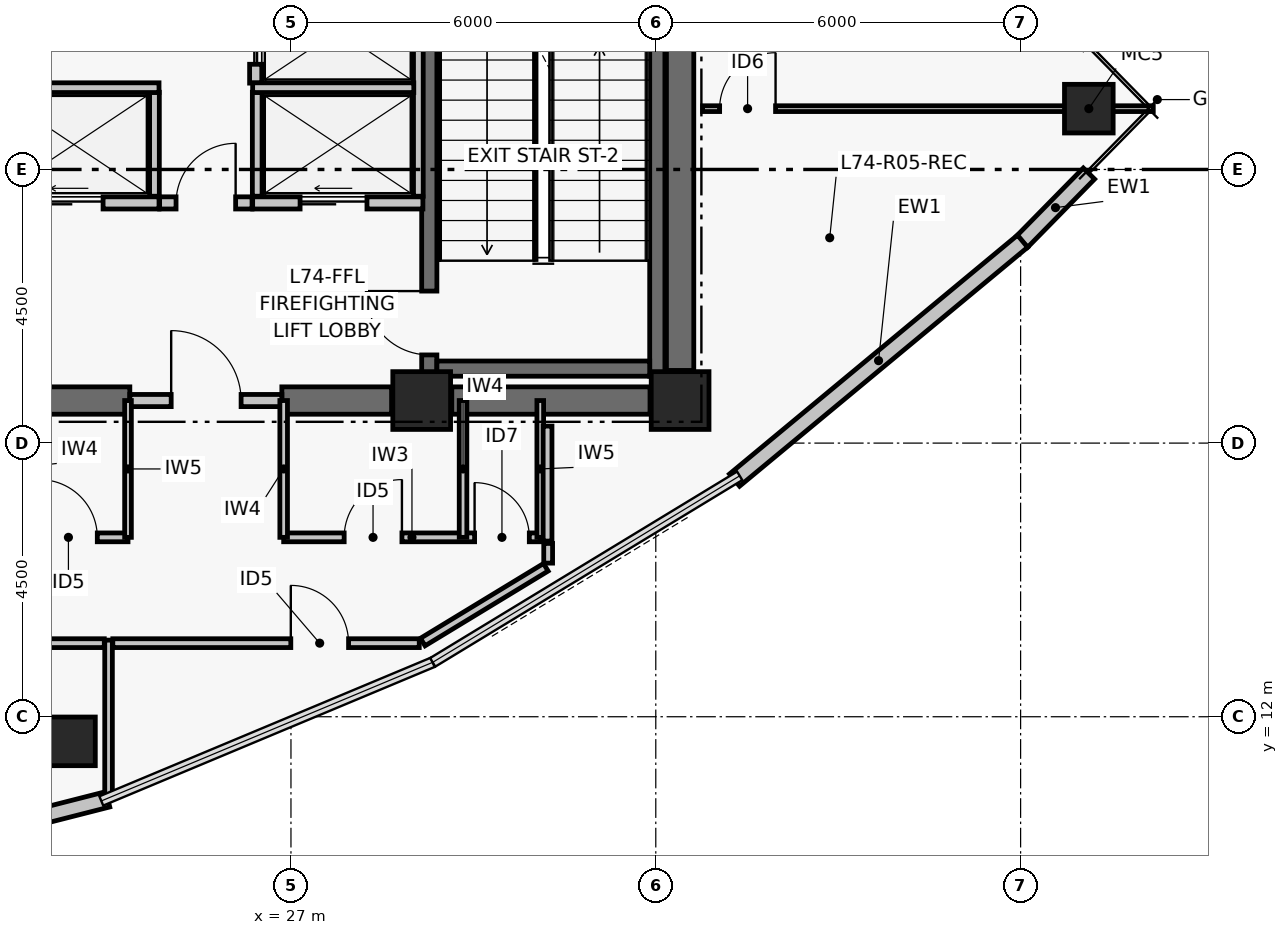
"""IFC4 building model, lengths in metres.
Left out: names, types, materials, properties, quantities, classifications, styles, units other than length and angle.
Written with IfcOpenShell. Run it as: python <this file> out.ifc"""

import sys

from ifc_helpers import new_model, si_unit, direction, frame, frame_2d, origin, origin_2d, place, context, subcontext, project, spatial, rectangle, hollow_rectangle, extrude, element, fill, save


model = new_model("IFC4")
c1 = context("Model", 3, precision=1e-05, world=origin(), true_north=direction((0.0, 1.0)))
c2 = subcontext(c1, "Body", "Model", "MODEL_VIEW")
j1 = project(units=[si_unit("LENGTHUNIT", "METRE"), si_unit("PLANEANGLEUNIT", "RADIAN")], contexts=[c1])
p1 = place(None, origin())
s1 = spatial("IfcSite", under=j1, at=p1, CompositionType="ELEMENT")
p2 = place(p1, origin())
s2 = spatial("IfcBuilding", under=s1, at=p2, CompositionType="ELEMENT")
p3 = place(p2, frame((0.0, 0.0, 291.78)))
s3 = spatial("IfcBuildingStorey", under=s2, at=p3, CompositionType="ELEMENT", Elevation=291.78)
for number, where, z_axis, x_axis in (
    (1, (29.15, 17.2, 0.0), (0.0, 0.0, 1.0), (1.0, 0.0, 0.0)),
    (2, (33.4, 17.2, 0.0), (0.0, 0.0, 1.0), (1.0, 0.0, 0.0)),
):
    element("IfcColumn", number, at=place(p3, frame(where, z_axis=z_axis, x_axis=x_axis)), inside=s3, PredefinedType="COLUMN", context=c2, shape_type="SweptSolid", body=[
        extrude(rectangle(XDim=0.95, YDim=0.95, at=origin_2d()), origin(), (0.0, 0.0, 1.0), 3.72),
    ])
p4 = place(p3, frame((22.545, 17.2, 0.0), z_axis=(0.0, 0.0, 1.0), x_axis=(1.0, 0.0, 0.0)))
e3 = element("IfcWall", 3, at=p4, inside=s3, PredefinedType="SHEAR", context=c2, shape_type="SweptSolid", body=[
    extrude(rectangle(XDim=1.805, YDim=0.45, at=frame_2d((0.903, 0.0))), origin(), (0.0, 0.0, 1.0), 3.5),
])
p5 = place(p3, frame((26.85, 17.2, 0.0), z_axis=(0.0, 0.0, 1.0), x_axis=(1.0, 0.0, 0.0)))
e4 = element("IfcWall", 4, at=p5, inside=s3, PredefinedType="SHEAR", context=c2, shape_type="SweptSolid", body=[
    extrude(rectangle(XDim=1.805, YDim=0.45, at=frame_2d((0.902, 0.0))), origin(), (0.0, 0.0, 1.0), 3.5),
])
p6 = place(p3, frame((29.645, 17.2, 0.0), z_axis=(0.0, 0.0, 1.0), x_axis=(1.0, 0.0, 0.0)))
e5 = element("IfcWall", 5, at=p6, inside=s3, PredefinedType="SHEAR", context=c2, shape_type="SweptSolid", body=[
    extrude(rectangle(XDim=3.26, YDim=0.45, at=frame_2d((1.63, 0.0))), origin(), (0.0, 0.0, 1.0), 3.5),
])
p7 = place(p3, frame((33.4, 17.695, 0.0), z_axis=(0.0, 0.0, 1.0), x_axis=(0.0, 1.0, 0.0)))
e6 = element("IfcWall", 6, at=p7, inside=s3, PredefinedType="SHEAR", context=c2, shape_type="SweptSolid", body=[
    extrude(rectangle(XDim=8.61, YDim=0.45, at=frame_2d((4.305, 0.0))), origin(), (0.0, 0.0, 1.0), 3.5),
])
p8 = place(p3, frame((29.275, 17.6, 0.0), z_axis=(0.0, 0.0, 1.0), x_axis=(0.0, 1.0, 0.0)))
e7 = element("IfcWall", 7, at=p8, inside=s3, PredefinedType="SHEAR", context=c2, shape_type="SweptSolid", body=[
    extrude(rectangle(XDim=8.8, YDim=0.25, at=frame_2d((4.4, 0.0))), origin(), (0.0, 0.0, 1.0), 3.5),
])
p9 = place(p8, frame((0.35, 0.0, 0.0)))
e8 = element("IfcOpeningElement", 8, at=p9, cuts=e7, PredefinedType="OPENING", context=c2, shape_type="SweptSolid", body=[
    extrude(rectangle(XDim=1.05, YDim=2.08, at=frame_2d((0.525, 1.04))), frame((0.0, 0.135, 0.0), z_axis=(0.0, -1.0, 0.0), x_axis=(1.0, 0.0, 0.0)), (0.0, 0.0, 1.0), 0.27),
])
p10 = place(p3, frame((33.025, 17.6, 0.0), z_axis=(0.0, 0.0, 1.0), x_axis=(0.0, 1.0, 0.0)))
e9 = element("IfcWall", 9, at=p10, inside=s3, PredefinedType="SHEAR", context=c2, shape_type="SweptSolid", body=[
    extrude(rectangle(XDim=8.8, YDim=0.25, at=frame_2d((4.4, 0.0))), origin(), (0.0, 0.0, 1.0), 3.5),
])
p11 = place(p3, frame((29.4, 17.725, 0.0), z_axis=(0.0, 0.0, 1.0), x_axis=(1.0, 0.0, 0.0)))
e10 = element("IfcWall", 10, at=p11, inside=s3, PredefinedType="SHEAR", context=c2, shape_type="SweptSolid", body=[
    extrude(rectangle(XDim=3.5, YDim=0.25, at=frame_2d((1.75, 0.0))), origin(), (0.0, 0.0, 1.0), 3.5),
])
for number, where, z_axis, x_axis in (
    (11, (40.122, 22.0, 0.0), (0.0, 0.0, 1.0), (1.0, 0.0, 0.0)),
    (12, (23.382, 11.595, 0.0), (0.0, 0.0, 1.0), (1.0, 0.0, 0.0)),
):
    element("IfcColumn", number, at=place(p3, frame(where, z_axis=z_axis, x_axis=x_axis)), inside=s3, PredefinedType="COLUMN", context=c2, shape_type="SweptSolid", body=[
        extrude(hollow_rectangle(XDim=0.8, YDim=0.8, WallThickness=0.035, at=origin_2d()), origin(), (0.0, 0.0, 1.0), 3.72),
    ])
p12 = place(p3, frame((40.124, 20.933, 0.0), z_axis=(0.0, 0.0, 1.0), x_axis=(-0.700470648387, -0.71368121087, 0.0)))
e13 = element("IfcWall", 13, at=p12, inside=s3, PredefinedType="PARTITIONING", context=c2, shape_type="SweptSolid", body=[
    extrude(rectangle(XDim=1.571, YDim=0.26, at=frame_2d((0.785, 0.0))), origin(), (0.0, 0.0, 1.0), 3.5),
])
p13 = place(p3, frame((23.988, 10.642, 0.0), z_axis=(0.0, 0.0, 1.0), x_axis=(-0.968988278672, -0.247106689096, 0.0)))
e14 = element("IfcWall", 14, at=p13, inside=s3, PredefinedType="PARTITIONING", context=c2, shape_type="SweptSolid", body=[
    extrude(rectangle(XDim=6.154, YDim=0.26, at=frame_2d((3.077, 0.0))), origin(), (0.0, 0.0, 1.0), 3.5),
])
p14 = place(p3, frame((39.032, 19.82, 0.0), z_axis=(0.0, 0.0, 1.0), x_axis=(-0.769779830138, -0.638309496337, 0.0)))
e15 = element("IfcWall", 15, at=p14, inside=s3, PredefinedType="PARTITIONING", context=c2, shape_type="SweptSolid", body=[
    extrude(rectangle(XDim=6.154, YDim=0.26, at=frame_2d((3.077, 0.0))), origin(), (0.0, 0.0, 1.0), 3.5),
])
p15 = place(p3, frame((24.35, 17.2, 0.0), z_axis=(0.0, 0.0, 1.0), x_axis=(1.0, 0.0, 0.0)))
e16 = element("IfcWall", 16, at=p15, inside=s3, PredefinedType="PARTITIONING", context=c2, shape_type="SweptSolid", body=[
    extrude(rectangle(XDim=2.5, YDim=0.2, at=frame_2d((1.25, 0.0))), origin(), (0.0, 0.0, 1.0), 2.63),
])
p16 = place(p15, frame((0.68, 0.0, 0.0)))
e17 = element("IfcOpeningElement", 17, at=p16, cuts=e16, PredefinedType="OPENING", context=c2, shape_type="SweptSolid", body=[
    extrude(rectangle(XDim=1.15, YDim=2.08, at=frame_2d((0.575, 1.04))), frame((0.0, 0.11, 0.0), z_axis=(0.0, -1.0, 0.0), x_axis=(1.0, 0.0, 0.0)), (0.0, 0.0, 1.0), 0.22),
])
p17 = place(p3, frame((24.84, 20.45, 0.0), z_axis=(0.0, 0.0, 1.0), x_axis=(1.0, 0.0, 0.0)))
e18 = element("IfcWall", 18, at=p17, inside=s3, PredefinedType="PARTITIONING", context=c2, shape_type="SweptSolid", body=[
    extrude(rectangle(XDim=1.52, YDim=0.2, at=frame_2d((0.76, 0.0))), origin(), (0.0, 0.0, 1.0), 3.5),
])
p18 = place(p17, frame((0.27, 0.0, 0.0)))
e19 = element("IfcOpeningElement", 19, at=p18, cuts=e18, PredefinedType="OPENING", context=c2, shape_type="SweptSolid", body=[
    extrude(rectangle(XDim=0.98, YDim=2.06, at=frame_2d((0.49, 1.03))), frame((0.0, 0.11, 0.0), z_axis=(0.0, -1.0, 0.0), x_axis=(1.0, 0.0, 0.0)), (0.0, 0.0, 1.0), 0.22),
])
p19 = place(p3, frame((22.03, 20.45, 0.0), z_axis=(0.0, 0.0, 1.0), x_axis=(1.0, 0.0, 0.0)))
e20 = element("IfcWall", 20, at=p19, inside=s3, PredefinedType="PARTITIONING", context=c2, shape_type="SweptSolid", body=[
    extrude(rectangle(XDim=2.8, YDim=0.2, at=frame_2d((1.4, 0.0))), origin(), (0.0, 0.0, 1.0), 3.5),
])
p20 = place(p19, frame((0.78, 0.0, 0.0)))
e21 = element("IfcOpeningElement", 21, at=p20, cuts=e20, PredefinedType="OPENING", context=c2, shape_type="SweptSolid", body=[
    extrude(rectangle(XDim=1.1, YDim=2.08, at=frame_2d((0.55, 1.04))), frame((0.0, 0.11, 0.0), z_axis=(0.0, -1.0, 0.0), x_axis=(1.0, 0.0, 0.0)), (0.0, 0.0, 1.0), 0.22),
])
p21 = place(p3, frame((26.37, 20.45, 0.0), z_axis=(0.0, 0.0, 1.0), x_axis=(1.0, 0.0, 0.0)))
e22 = element("IfcWall", 22, at=p21, inside=s3, PredefinedType="PARTITIONING", context=c2, shape_type="SweptSolid", body=[
    extrude(rectangle(XDim=2.8, YDim=0.2, at=frame_2d((1.4, 0.0))), origin(), (0.0, 0.0, 1.0), 3.5),
])
p22 = place(p21, frame((0.78, 0.0, 0.0)))
e23 = element("IfcOpeningElement", 23, at=p22, cuts=e22, PredefinedType="OPENING", context=c2, shape_type="SweptSolid", body=[
    extrude(rectangle(XDim=1.1, YDim=2.08, at=frame_2d((0.55, 1.04))), frame((0.0, 0.11, 0.0), z_axis=(0.0, -1.0, 0.0), x_axis=(1.0, 0.0, 0.0)), (0.0, 0.0, 1.0), 0.22),
])
p23 = place(p3, frame((26.42, 22.42, 0.0), z_axis=(0.0, 0.0, 1.0), x_axis=(0.0, 1.0, 0.0)))
e24 = element("IfcWall", 24, at=p23, inside=s3, PredefinedType="PARTITIONING", context=c2, shape_type="SweptSolid", body=[
    extrude(rectangle(XDim=1.72, YDim=0.2, at=frame_2d((0.86, 0.0))), origin(), (0.0, 0.0, 1.0), 3.5),
])
p24 = place(p23, frame((0.31, 0.0, 0.0)))
e25 = element("IfcOpeningElement", 25, at=p24, cuts=e24, PredefinedType="OPENING", context=c2, shape_type="SweptSolid", body=[
    extrude(rectangle(XDim=1.1, YDim=2.08, at=frame_2d((0.55, 1.04))), frame((0.0, 0.11, 0.0), z_axis=(0.0, -1.0, 0.0), x_axis=(1.0, 0.0, 0.0)), (0.0, 0.0, 1.0), 0.22),
])
p25 = place(p3, frame((24.755, 20.56, 0.0), z_axis=(0.0, 0.0, 1.0), x_axis=(0.0, 1.0, 0.0)))
e26 = element("IfcWall", 26, at=p25, inside=s3, PredefinedType="PARTITIONING", context=c2, shape_type="SweptSolid", body=[
    extrude(rectangle(XDim=1.71, YDim=0.16, at=frame_2d((0.855, 0.0))), origin(), (0.0, 0.0, 1.0), 3.5),
])
p26 = place(p3, frame((22.18, 22.345, 0.0), z_axis=(0.0, 0.0, 1.0), x_axis=(1.0, 0.0, 0.0)))
e27 = element("IfcWall", 27, at=p26, inside=s3, PredefinedType="PARTITIONING", context=c2, shape_type="SweptSolid", body=[
    extrude(rectangle(XDim=2.65, YDim=0.16, at=frame_2d((1.325, 0.0))), origin(), (0.0, 0.0, 1.0), 3.5),
])
p27 = place(p3, frame((29.095, 20.56, 0.0), z_axis=(0.0, 0.0, 1.0), x_axis=(0.0, 1.0, 0.0)))
e28 = element("IfcWall", 28, at=p27, inside=s3, PredefinedType="PARTITIONING", context=c2, shape_type="SweptSolid", body=[
    extrude(rectangle(XDim=3.58, YDim=0.16, at=frame_2d((1.79, 0.0))), origin(), (0.0, 0.0, 1.0), 3.5),
])
p28 = place(p3, frame((26.445, 20.56, 0.0), z_axis=(0.0, 0.0, 1.0), x_axis=(0.0, 1.0, 0.0)))
e29 = element("IfcWall", 29, at=p28, inside=s3, PredefinedType="PARTITIONING", context=c2, shape_type="SweptSolid", body=[
    extrude(rectangle(XDim=1.71, YDim=0.16, at=frame_2d((0.855, 0.0))), origin(), (0.0, 0.0, 1.0), 3.5),
])
p29 = place(p3, frame((26.37, 22.345, 0.0), z_axis=(0.0, 0.0, 1.0), x_axis=(1.0, 0.0, 0.0)))
e30 = element("IfcWall", 30, at=p29, inside=s3, PredefinedType="PARTITIONING", context=c2, shape_type="SweptSolid", body=[
    extrude(rectangle(XDim=2.65, YDim=0.16, at=frame_2d((1.325, 0.0))), origin(), (0.0, 0.0, 1.0), 3.5),
])
p30 = place(p3, frame((19.1, 14.95, 0.0), z_axis=(0.0, 0.0, 1.0), x_axis=(1.0, 0.0, 0.0)))
e31 = element("IfcWall", 31, at=p30, inside=s3, PredefinedType="PARTITIONING", context=c2, shape_type="SweptSolid", body=[
    extrude(rectangle(XDim=5.22, YDim=0.145, at=frame_2d((2.61, 0.0))), origin(), (0.0, 0.0, 1.0), 2.83),
])
p31 = place(p30, frame((0.2, 0.0, 0.0)))
e32 = element("IfcOpeningElement", 32, at=p31, cuts=e31, PredefinedType="OPENING", context=c2, shape_type="SweptSolid", body=[
    extrude(rectangle(XDim=0.9, YDim=2.02, at=frame_2d((0.45, 1.01))), frame((0.0, 0.083, 0.0), z_axis=(0.0, -1.0, 0.0), x_axis=(1.0, 0.0, 0.0)), (0.0, 0.0, 1.0), 0.165),
])
p32 = place(p30, frame((1.805, 0.0, 0.0)))
e33 = element("IfcOpeningElement", 33, at=p32, cuts=e31, PredefinedType="OPENING", context=c2, shape_type="SweptSolid", body=[
    extrude(rectangle(XDim=0.95, YDim=2.06, at=frame_2d((0.475, 1.03))), frame((0.0, 0.083, 0.0), z_axis=(0.0, -1.0, 0.0), x_axis=(1.0, 0.0, 0.0)), (0.0, 0.0, 1.0), 0.165),
])
p33 = place(p30, frame((3.765, 0.0, 0.0)))
e34 = element("IfcOpeningElement", 34, at=p33, cuts=e31, PredefinedType="OPENING", context=c2, shape_type="SweptSolid", body=[
    extrude(rectangle(XDim=0.95, YDim=2.06, at=frame_2d((0.475, 1.03))), frame((0.0, 0.083, 0.0), z_axis=(0.0, -1.0, 0.0), x_axis=(1.0, 0.0, 0.0)), (0.0, 0.0, 1.0), 0.165),
])
p34 = place(p3, frame((26.88, 14.95, 0.0), z_axis=(0.0, 0.0, 1.0), x_axis=(1.0, 0.0, 0.0)))
e35 = element("IfcWall", 35, at=p34, inside=s3, PredefinedType="PARTITIONING", context=c2, shape_type="SweptSolid", body=[
    extrude(rectangle(XDim=4.22, YDim=0.145, at=frame_2d((2.11, 0.0))), origin(), (0.0, 0.0, 1.0), 2.98),
])
p35 = place(p34, frame((0.995, 0.0, 0.0)))
e36 = element("IfcOpeningElement", 36, at=p35, cuts=e35, PredefinedType="OPENING", context=c2, shape_type="SweptSolid", body=[
    extrude(rectangle(XDim=0.95, YDim=2.06, at=frame_2d((0.475, 1.03))), frame((0.0, 0.083, 0.0), z_axis=(0.0, -1.0, 0.0), x_axis=(1.0, 0.0, 0.0)), (0.0, 0.0, 1.0), 0.165),
])
p36 = place(p34, frame((3.14, 0.0, 0.0)))
e37 = element("IfcOpeningElement", 37, at=p36, cuts=e35, PredefinedType="OPENING", context=c2, shape_type="SweptSolid", body=[
    extrude(rectangle(XDim=0.9, YDim=2.02, at=frame_2d((0.45, 1.01))), frame((0.0, 0.083, 0.0), z_axis=(0.0, -1.0, 0.0), x_axis=(1.0, 0.0, 0.0)), (0.0, 0.0, 1.0), 0.165),
])
p37 = place(p3, frame((24.32, 14.95, 0.0), z_axis=(0.0, 0.0, 1.0), x_axis=(0.0, 1.0, 0.0)))
e38 = element("IfcWall", 38, at=p37, inside=s3, PredefinedType="PARTITIONING", context=c2, shape_type="SweptSolid", body=[
    extrude(rectangle(XDim=2.25, YDim=0.11, at=frame_2d((1.125, 0.0))), origin(), (0.0, 0.0, 1.0), 2.63),
])
for number, where, z_axis, x_axis in (
    (39, (26.88, 14.95, 0.0), (0.0, 0.0, 1.0), (0.0, 1.0, 0.0)),
    (40, (29.83, 14.95, 0.0), (0.0, 0.0, 1.0), (0.0, 1.0, 0.0)),
):
    element("IfcWall", number, at=place(p3, frame(where, z_axis=z_axis, x_axis=x_axis)), inside=s3, PredefinedType="PARTITIONING", context=c2, shape_type="SweptSolid", body=[
        extrude(rectangle(XDim=2.25, YDim=0.125, at=frame_2d((1.125, 0.0))), origin(), (0.0, 0.0, 1.0), 2.63),
    ])
p38 = place(p3, frame((31.1, 14.95, 0.0), z_axis=(0.0, 0.0, 1.0), x_axis=(0.0, 1.0, 0.0)))
e41 = element("IfcWall", 41, at=p38, inside=s3, PredefinedType="PARTITIONING", context=c2, shape_type="SweptSolid", body=[
    extrude(rectangle(XDim=2.25, YDim=0.11, at=frame_2d((1.125, 0.0))), origin(), (0.0, 0.0, 1.0), 2.63),
])
p39 = place(p3, frame((17.54, 13.21, 0.0), z_axis=(0.0, 0.0, 1.0), x_axis=(1.0, 0.0, 0.0)))
e42 = element("IfcWall", 42, at=p39, inside=s3, PredefinedType="PARTITIONING", context=c2, shape_type="SweptSolid", body=[
    extrude(rectangle(XDim=6.39, YDim=0.145, at=frame_2d((3.195, 0.0))), origin(), (0.0, 0.0, 1.0), 2.83),
])
p40 = place(p39, frame((1.508, 0.0, 0.0)))
e43 = element("IfcOpeningElement", 43, at=p40, cuts=e42, PredefinedType="OPENING", context=c2, shape_type="SweptSolid", body=[
    extrude(rectangle(XDim=0.92, YDim=2.05, at=frame_2d((0.46, 1.025))), frame((0.0, 0.083, 0.0), z_axis=(0.0, -1.0, 0.0), x_axis=(1.0, 0.0, 0.0)), (0.0, 0.0, 1.0), 0.165),
])
p41 = place(p3, frame((24.07, 13.21, 0.0), z_axis=(0.0, 0.0, 1.0), x_axis=(1.0, 0.0, 0.0)))
e44 = element("IfcWall", 44, at=p41, inside=s3, PredefinedType="PARTITIONING", context=c2, shape_type="SweptSolid", body=[
    extrude(rectangle(XDim=5.04, YDim=0.145, at=frame_2d((2.52, 0.0))), origin(), (0.0, 0.0, 1.0), 2.98),
])
p42 = place(p41, frame((2.927, 0.0, 0.0)))
e45 = element("IfcOpeningElement", 45, at=p42, cuts=e44, PredefinedType="OPENING", context=c2, shape_type="SweptSolid", body=[
    extrude(rectangle(XDim=0.95, YDim=2.06, at=frame_2d((0.475, 1.03))), frame((0.0, 0.083, 0.0), z_axis=(0.0, -1.0, 0.0), x_axis=(1.0, 0.0, 0.0)), (0.0, 0.0, 1.0), 0.165),
])
p43 = place(p3, frame((29.168, 13.229, 0.0), z_axis=(0.0, 0.0, 1.0), x_axis=(0.854678044033, 0.519158396876, 0.0)))
e46 = element("IfcWall", 46, at=p43, inside=s3, PredefinedType="PARTITIONING", context=c2, shape_type="SweptSolid", body=[
    extrude(rectangle(XDim=2.368, YDim=0.145, at=frame_2d((1.184, 0.0))), origin(), (0.0, 0.0, 1.0), 3.5),
])
p44 = place(p3, frame((31.23, 14.526, 0.0), z_axis=(0.0, 0.0, 1.0), x_axis=(0.0, 1.0, 0.0)))
e47 = element("IfcWall", 47, at=p44, inside=s3, PredefinedType="PARTITIONING", context=c2, shape_type="SweptSolid", body=[
    extrude(rectangle(XDim=0.324, YDim=0.145, at=frame_2d((0.162, 0.0))), origin(), (0.0, 0.0, 1.0), 3.5),
])
p45 = place(p3, frame((31.22, 14.889, 0.0), z_axis=(0.0, 0.0, 1.0), x_axis=(0.0, 1.0, 0.0)))
e48 = element("IfcWall", 48, at=p45, inside=s3, PredefinedType="PARTITIONING", context=c2, shape_type="SweptSolid", body=[
    extrude(rectangle(XDim=1.891, YDim=0.145, at=frame_2d((0.946, 0.0))), origin(), (0.0, 0.0, 1.0), 2.63),
])
p46 = place(p3, frame((24.0, 10.654, 0.0), z_axis=(0.0, 0.0, 1.0), x_axis=(0.0, 1.0, 0.0)))
e49 = element("IfcWall", 49, at=p46, inside=s3, PredefinedType="PARTITIONING", context=c2, shape_type="SweptSolid", body=[
    extrude(rectangle(XDim=2.606, YDim=0.125, at=frame_2d((1.303, 0.0))), origin(), (0.0, 0.0, 1.0), 2.98),
])
p47 = place(p3, frame((33.77, 22.0, 0.0), z_axis=(0.0, 0.0, 1.0), x_axis=(1.0, 0.0, 0.0)))
e50 = element("IfcWall", 50, at=p47, inside=s3, PredefinedType="PARTITIONING", context=c2, shape_type="SweptSolid", body=[
    extrude(rectangle(XDim=7.412, YDim=0.095, at=frame_2d((3.706, 0.0))), origin(), (0.0, 0.0, 1.0), 2.63),
])
p48 = place(p47, frame((0.28, 0.0, 0.0)))
e51 = element("IfcOpeningElement", 51, at=p48, cuts=e50, PredefinedType="OPENING", context=c2, shape_type="SweptSolid", body=[
    extrude(rectangle(XDim=0.92, YDim=2.05, at=frame_2d((0.46, 1.025))), frame((0.0, 0.057, 0.0), z_axis=(0.0, -1.0, 0.0), x_axis=(1.0, 0.0, 0.0)), (0.0, 0.0, 1.0), 0.115),
])
p49 = place(p9, origin())
e52 = element("IfcDoor", 52, at=p49, inside=s3, OperationType="SINGLE_SWING_RIGHT", PredefinedType="DOOR", context=c2, shape_type="SweptSolid", body=[
    extrude(rectangle(XDim=1.05, YDim=2.08, at=frame_2d((0.525, 1.04))), frame((0.0, 0.025, 0.0), z_axis=(0.0, -1.0, 0.0), x_axis=(1.0, 0.0, 0.0)), (0.0, 0.0, 1.0), 0.05),
])
fill(e8, e52)
p50 = place(p16, origin())
e53 = element("IfcDoor", 53, at=p50, inside=s3, OperationType="SINGLE_SWING_LEFT", PredefinedType="DOOR", context=c2, shape_type="SweptSolid", body=[
    extrude(rectangle(XDim=1.15, YDim=2.08, at=frame_2d((0.575, 1.04))), frame((0.0, 0.025, 0.0), z_axis=(0.0, -1.0, 0.0), x_axis=(1.0, 0.0, 0.0)), (0.0, 0.0, 1.0), 0.05),
])
fill(e17, e53)
p51 = place(p18, origin())
e54 = element("IfcDoor", 54, at=p51, inside=s3, OperationType="SINGLE_SWING_RIGHT", PredefinedType="DOOR", context=c2, shape_type="SweptSolid", body=[
    extrude(rectangle(XDim=0.98, YDim=2.06, at=frame_2d((0.49, 1.03))), frame((0.0, 0.025, 0.0), z_axis=(0.0, -1.0, 0.0), x_axis=(1.0, 0.0, 0.0)), (0.0, 0.0, 1.0), 0.05),
])
fill(e19, e54)
p52 = place(p20, origin())
e55 = element("IfcDoor", 55, at=p52, inside=s3, OperationType="DOUBLE_DOOR_SLIDING", PredefinedType="DOOR", context=c2, shape_type="SweptSolid", body=[
    extrude(rectangle(XDim=1.1, YDim=2.08, at=frame_2d((0.55, 1.04))), frame((0.0, 0.025, 0.0), z_axis=(0.0, -1.0, 0.0), x_axis=(1.0, 0.0, 0.0)), (0.0, 0.0, 1.0), 0.05),
])
fill(e21, e55)
p53 = place(p22, origin())
e56 = element("IfcDoor", 56, at=p53, inside=s3, OperationType="DOUBLE_DOOR_SLIDING", PredefinedType="DOOR", context=c2, shape_type="SweptSolid", body=[
    extrude(rectangle(XDim=1.1, YDim=2.08, at=frame_2d((0.55, 1.04))), frame((0.0, 0.025, 0.0), z_axis=(0.0, -1.0, 0.0), x_axis=(1.0, 0.0, 0.0)), (0.0, 0.0, 1.0), 0.05),
])
fill(e23, e56)
p54 = place(p24, origin())
e57 = element("IfcDoor", 57, at=p54, inside=s3, OperationType="DOUBLE_DOOR_SLIDING", PredefinedType="DOOR", context=c2, shape_type="SweptSolid", body=[
    extrude(rectangle(XDim=1.1, YDim=2.08, at=frame_2d((0.55, 1.04))), frame((0.0, 0.025, 0.0), z_axis=(0.0, -1.0, 0.0), x_axis=(1.0, 0.0, 0.0)), (0.0, 0.0, 1.0), 0.05),
])
fill(e25, e57)
p55 = place(p33, origin())
e58 = element("IfcDoor", 58, at=p55, inside=s3, OperationType="SINGLE_SWING_LEFT", PredefinedType="DOOR", context=c2, shape_type="SweptSolid", body=[
    extrude(rectangle(XDim=0.95, YDim=2.06, at=frame_2d((0.475, 1.03))), frame((0.0, 0.025, 0.0), z_axis=(0.0, -1.0, 0.0), x_axis=(1.0, 0.0, 0.0)), (0.0, 0.0, 1.0), 0.05),
])
fill(e34, e58)
p56 = place(p35, origin())
e59 = element("IfcDoor", 59, at=p56, inside=s3, OperationType="SINGLE_SWING_RIGHT", PredefinedType="DOOR", context=c2, shape_type="SweptSolid", body=[
    extrude(rectangle(XDim=0.95, YDim=2.06, at=frame_2d((0.475, 1.03))), frame((0.0, 0.025, 0.0), z_axis=(0.0, -1.0, 0.0), x_axis=(1.0, 0.0, 0.0)), (0.0, 0.0, 1.0), 0.05),
])
fill(e36, e59)
p57 = place(p36, origin())
e60 = element("IfcDoor", 60, at=p57, inside=s3, OperationType="SINGLE_SWING_LEFT", PredefinedType="DOOR", context=c2, shape_type="SweptSolid", body=[
    extrude(rectangle(XDim=0.9, YDim=2.02, at=frame_2d((0.45, 1.01))), frame((0.0, 0.025, 0.0), z_axis=(0.0, -1.0, 0.0), x_axis=(1.0, 0.0, 0.0)), (0.0, 0.0, 1.0), 0.05),
])
fill(e37, e60)
p58 = place(p42, origin())
e61 = element("IfcDoor", 61, at=p58, inside=s3, OperationType="SINGLE_SWING_LEFT", PredefinedType="DOOR", context=c2, shape_type="SweptSolid", body=[
    extrude(rectangle(XDim=0.95, YDim=2.06, at=frame_2d((0.475, 1.03))), frame((0.0, 0.025, 0.0), z_axis=(0.0, -1.0, 0.0), x_axis=(1.0, 0.0, 0.0)), (0.0, 0.0, 1.0), 0.05),
])
fill(e45, e61)
p59 = place(p48, origin())
e62 = element("IfcDoor", 62, at=p59, inside=s3, OperationType="SINGLE_SWING_RIGHT", PredefinedType="DOOR", context=c2, shape_type="SweptSolid", body=[
    extrude(rectangle(XDim=0.92, YDim=2.05, at=frame_2d((0.46, 1.025))), frame((0.0, 0.025, 0.0), z_axis=(0.0, -1.0, 0.0), x_axis=(1.0, 0.0, 0.0)), (0.0, 0.0, 1.0), 0.05),
])
fill(e51, e62)
save(model, sys.argv[1])
